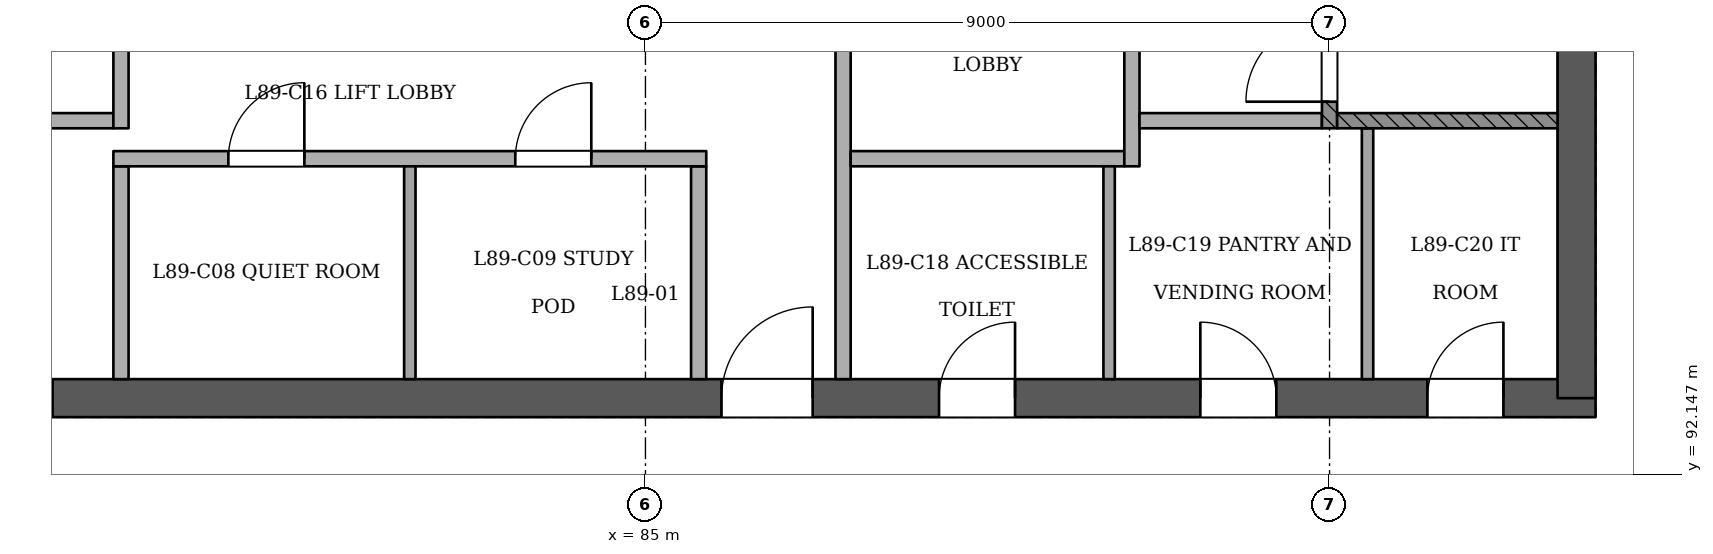
"""IFC4 building model, lengths in metres.
Left out: names, types, materials, properties, quantities, classifications, styles, units other than length and angle.
Written with IfcOpenShell. Run it as: python <this file> out.ifc"""

import sys

from ifc_helpers import new_model, si_unit, direction, frame, frame_2d, origin, place, context, subcontext, project, spatial, rectangle, extrude, element, fill, save


model = new_model("IFC4")
c1 = context("Model", 3, precision=1e-05, world=origin(), true_north=direction((0.0, 1.0)))
c2 = subcontext(c1, "Body", "Model", "MODEL_VIEW")
j1 = project(units=[si_unit("LENGTHUNIT", "METRE"), si_unit("PLANEANGLEUNIT", "RADIAN")], contexts=[c1])
p1 = place(None, origin())
s1 = spatial("IfcSite", under=j1, at=p1, CompositionType="ELEMENT")
p2 = place(p1, origin())
s2 = spatial("IfcBuilding", under=s1, at=p2, CompositionType="ELEMENT")
p3 = place(p2, frame((0.0, 0.0, 343.0)))
s3 = spatial("IfcBuildingStorey", under=s2, at=p3, CompositionType="ELEMENT", Elevation=343.0)
p4 = place(p3, frame((72.75, 93.15, 0.0), z_axis=(0.0, 0.0, 1.0), x_axis=(1.0, 0.0, 0.0)))
e1 = element("IfcWall", 1, at=p4, inside=s3, PredefinedType="SHEAR", context=c2, shape_type="SweptSolid", body=[
    extrude(rectangle(XDim=24.75, YDim=0.5, at=frame_2d((12.375, 0.0))), origin(), (0.0, 0.0, 1.0), 4.2),
])
p5 = place(p4, frame((1.05, 0.0, 0.0)))
e2 = element("IfcOpeningElement", 2, at=p5, cuts=e1, PredefinedType="OPENING", context=c2, shape_type="SweptSolid", body=[
    extrude(rectangle(XDim=1.2, YDim=2.1, at=frame_2d((0.6, 1.05))), frame((0.0, 0.26, 0.0), z_axis=(0.0, -1.0, 0.0), x_axis=(1.0, 0.0, 0.0)), (0.0, 0.0, 1.0), 0.521),
])
p6 = place(p4, frame((3.25, 0.0, 0.0)))
e3 = element("IfcOpeningElement", 3, at=p6, cuts=e1, PredefinedType="OPENING", context=c2, shape_type="SweptSolid", body=[
    extrude(rectangle(XDim=1.2, YDim=2.1, at=frame_2d((0.6, 1.05))), frame((0.0, 0.26, 0.0), z_axis=(0.0, -1.0, 0.0), x_axis=(1.0, 0.0, 0.0)), (0.0, 0.0, 1.0), 0.521),
])
p7 = place(p4, frame((13.25, 0.0, 0.0)))
e4 = element("IfcOpeningElement", 4, at=p7, cuts=e1, PredefinedType="OPENING", context=c2, shape_type="SweptSolid", body=[
    extrude(rectangle(XDim=1.2, YDim=2.1, at=frame_2d((0.6, 1.05))), frame((0.0, 0.26, 0.0), z_axis=(0.0, -1.0, 0.0), x_axis=(1.0, 0.0, 0.0)), (0.0, 0.0, 1.0), 0.521),
])
p8 = place(p4, frame((16.113, 0.0, 0.0)))
e5 = element("IfcOpeningElement", 5, at=p8, cuts=e1, PredefinedType="OPENING", context=c2, shape_type="SweptSolid", body=[
    extrude(rectangle(XDim=1.0, YDim=2.1, at=frame_2d((0.5, 1.05))), frame((0.0, 0.26, 0.0), z_axis=(0.0, -1.0, 0.0), x_axis=(1.0, 0.0, 0.0)), (0.0, 0.0, 1.0), 0.521),
])
p9 = place(p4, frame((19.55, 0.0, 0.0)))
e6 = element("IfcOpeningElement", 6, at=p9, cuts=e1, PredefinedType="OPENING", context=c2, shape_type="SweptSolid", body=[
    extrude(rectangle(XDim=1.0, YDim=2.1, at=frame_2d((0.5, 1.05))), frame((0.0, 0.26, 0.0), z_axis=(0.0, -1.0, 0.0), x_axis=(1.0, 0.0, 0.0)), (0.0, 0.0, 1.0), 0.521),
])
p10 = place(p4, frame((22.538, 0.0, 0.0)))
e7 = element("IfcOpeningElement", 7, at=p10, cuts=e1, PredefinedType="OPENING", context=c2, shape_type="SweptSolid", body=[
    extrude(rectangle(XDim=1.0, YDim=2.1, at=frame_2d((0.5, 1.05))), frame((0.0, 0.26, 0.0), z_axis=(0.0, -1.0, 0.0), x_axis=(1.0, 0.0, 0.0)), (0.0, 0.0, 1.0), 0.521),
])
p11 = place(p3, frame((97.25, 93.15, 0.0), z_axis=(0.0, 0.0, 1.0), x_axis=(0.0, 1.0, 0.0)))
e8 = element("IfcWall", 8, at=p11, inside=s3, PredefinedType="SHEAR", context=c2, shape_type="SweptSolid", body=[
    extrude(rectangle(XDim=10.75, YDim=0.5, at=frame_2d((5.375, 0.0))), origin(), (0.0, 0.0, 1.0), 4.2),
])
p12 = place(p3, frame((78.1, 93.4, 0.0), z_axis=(0.0, 0.0, 1.0), x_axis=(0.0, 1.0, 0.0)))
e9 = element("IfcWall", 9, at=p12, inside=s3, PredefinedType="PARTITIONING", context=c2, shape_type="SweptSolid", body=[
    extrude(rectangle(XDim=2.8, YDim=0.2, at=frame_2d((1.4, 0.0))), origin(), (0.0, 0.0, 1.0), 3.8),
])
p13 = place(p3, frame((81.9, 93.4, 0.0), z_axis=(0.0, 0.0, 1.0), x_axis=(0.0, 1.0, 0.0)))
e10 = element("IfcWall", 10, at=p13, inside=s3, PredefinedType="PARTITIONING", context=c2, shape_type="SweptSolid", body=[
    extrude(rectangle(XDim=2.8, YDim=0.15, at=frame_2d((1.4, 0.0))), origin(), (0.0, 0.0, 1.0), 3.8),
])
p14 = place(p3, frame((85.7, 93.4, 0.0), z_axis=(0.0, 0.0, 1.0), x_axis=(0.0, 1.0, 0.0)))
e11 = element("IfcWall", 11, at=p14, inside=s3, PredefinedType="PARTITIONING", context=c2, shape_type="SweptSolid", body=[
    extrude(rectangle(XDim=2.8, YDim=0.2, at=frame_2d((1.4, 0.0))), origin(), (0.0, 0.0, 1.0), 3.8),
])
p15 = place(p3, frame((87.6, 93.4, 0.0), z_axis=(0.0, 0.0, 1.0), x_axis=(0.0, 1.0, 0.0)))
e12 = element("IfcWall", 12, at=p15, inside=s3, PredefinedType="PARTITIONING", context=c2, shape_type="SweptSolid", body=[
    extrude(rectangle(XDim=7.0, YDim=0.2, at=frame_2d((3.5, 0.0))), origin(), (0.0, 0.0, 1.0), 3.8),
])
p16 = place(p15, frame((4.45, 0.0, 0.0)))
e13 = element("IfcOpeningElement", 13, at=p16, cuts=e12, PredefinedType="OPENING", context=c2, shape_type="SweptSolid", body=[
    extrude(rectangle(XDim=1.1, YDim=2.1, at=frame_2d((0.55, 1.05))), frame((0.0, 0.11, 0.0), z_axis=(0.0, -1.0, 0.0), x_axis=(1.0, 0.0, 0.0)), (0.0, 0.0, 1.0), 0.221),
])
p17 = place(p3, frame((91.1, 93.4, 0.0), z_axis=(0.0, 0.0, 1.0), x_axis=(0.0, 1.0, 0.0)))
e14 = element("IfcWall", 14, at=p17, inside=s3, PredefinedType="PARTITIONING", context=c2, shape_type="SweptSolid", body=[
    extrude(rectangle(XDim=2.8, YDim=0.15, at=frame_2d((1.4, 0.0))), origin(), (0.0, 0.0, 1.0), 3.8),
])
p18 = place(p3, frame((94.5, 93.4, 0.0), z_axis=(0.0, 0.0, 1.0), x_axis=(0.0, 1.0, 0.0)))
e15 = element("IfcWall", 15, at=p18, inside=s3, PredefinedType="PARTITIONING", context=c2, shape_type="SweptSolid", body=[
    extrude(rectangle(XDim=3.3, YDim=0.15, at=frame_2d((1.65, 0.0))), origin(), (0.0, 0.0, 1.0), 3.8),
])
p19 = place(p3, frame((78.0, 96.3, 0.0), z_axis=(0.0, 0.0, 1.0), x_axis=(1.0, 0.0, 0.0)))
e16 = element("IfcWall", 16, at=p19, inside=s3, PredefinedType="PARTITIONING", context=c2, shape_type="SweptSolid", body=[
    extrude(rectangle(XDim=7.8, YDim=0.2, at=frame_2d((3.9, 0.0))), origin(), (0.0, 0.0, 1.0), 3.8),
])
p20 = place(p19, frame((1.512, 0.0, 0.0)))
e17 = element("IfcOpeningElement", 17, at=p20, cuts=e16, PredefinedType="OPENING", context=c2, shape_type="SweptSolid", body=[
    extrude(rectangle(XDim=1.0, YDim=2.1, at=frame_2d((0.5, 1.05))), frame((0.0, 0.11, 0.0), z_axis=(0.0, -1.0, 0.0), x_axis=(1.0, 0.0, 0.0)), (0.0, 0.0, 1.0), 0.221),
])
p21 = place(p19, frame((5.288, 0.0, 0.0)))
e18 = element("IfcOpeningElement", 18, at=p21, cuts=e16, PredefinedType="OPENING", context=c2, shape_type="SweptSolid", body=[
    extrude(rectangle(XDim=1.0, YDim=2.1, at=frame_2d((0.5, 1.05))), frame((0.0, 0.11, 0.0), z_axis=(0.0, -1.0, 0.0), x_axis=(1.0, 0.0, 0.0)), (0.0, 0.0, 1.0), 0.221),
])
p22 = place(p3, frame((87.7, 96.3, 0.0), z_axis=(0.0, 0.0, 1.0), x_axis=(1.0, 0.0, 0.0)))
e19 = element("IfcWall", 19, at=p22, inside=s3, PredefinedType="PARTITIONING", context=c2, shape_type="SweptSolid", body=[
    extrude(rectangle(XDim=3.6, YDim=0.2, at=frame_2d((1.8, 0.0))), origin(), (0.0, 0.0, 1.0), 3.8),
])
p23 = place(p3, frame((91.4, 96.2, 0.0), z_axis=(0.0, 0.0, 1.0), x_axis=(0.0, 1.0, 0.0)))
e20 = element("IfcWall", 20, at=p23, inside=s3, PredefinedType="PARTITIONING", context=c2, shape_type="SweptSolid", body=[
    extrude(rectangle(XDim=4.2, YDim=0.2, at=frame_2d((2.1, 0.0))), origin(), (0.0, 0.0, 1.0), 3.8),
])
p24 = place(p23, frame((2.45, 0.0, 0.0)))
e21 = element("IfcOpeningElement", 21, at=p24, cuts=e20, PredefinedType="OPENING", context=c2, shape_type="SweptSolid", body=[
    extrude(rectangle(XDim=1.1, YDim=2.1, at=frame_2d((0.55, 1.05))), frame((0.0, 0.11, 0.0), z_axis=(0.0, -1.0, 0.0), x_axis=(1.0, 0.0, 0.0)), (0.0, 0.0, 1.0), 0.221),
])
p25 = place(p3, frame((76.1, 96.8, 0.0), z_axis=(0.0, 0.0, 1.0), x_axis=(1.0, 0.0, 0.0)))
e22 = element("IfcWall", 22, at=p25, inside=s3, PredefinedType="PARTITIONING", context=c2, shape_type="SweptSolid", body=[
    extrude(rectangle(XDim=1.9, YDim=0.2, at=frame_2d((0.95, 0.0))), origin(), (0.0, 0.0, 1.0), 3.8),
])
p26 = place(p3, frame((78.1, 96.7, 0.0), z_axis=(0.0, 0.0, 1.0), x_axis=(0.0, 1.0, 0.0)))
e23 = element("IfcWall", 23, at=p26, inside=s3, PredefinedType="PARTITIONING", context=c2, shape_type="SweptSolid", body=[
    extrude(rectangle(XDim=3.7, YDim=0.2, at=frame_2d((1.85, 0.0))), origin(), (0.0, 0.0, 1.0), 3.8),
])
p27 = place(p26, frame((1.95, 0.0, 0.0)))
e24 = element("IfcOpeningElement", 24, at=p27, cuts=e23, PredefinedType="OPENING", context=c2, shape_type="SweptSolid", body=[
    extrude(rectangle(XDim=1.1, YDim=2.1, at=frame_2d((0.55, 1.05))), frame((0.0, 0.11, 0.0), z_axis=(0.0, -1.0, 0.0), x_axis=(1.0, 0.0, 0.0)), (0.0, 0.0, 1.0), 0.221),
])
p28 = place(p3, frame((91.5, 96.8, 0.0), z_axis=(0.0, 0.0, 1.0), x_axis=(1.0, 0.0, 0.0)))
e25 = element("IfcWall", 25, at=p28, inside=s3, PredefinedType="PARTITIONING", context=c2, shape_type="SweptSolid", body=[
    extrude(rectangle(XDim=2.4, YDim=0.2, at=frame_2d((1.2, 0.0))), origin(), (0.0, 0.0, 1.0), 3.8),
])
p29 = place(p3, frame((94.0, 96.7, 0.0), z_axis=(0.0, 0.0, 1.0), x_axis=(0.0, 1.0, 0.0)))
e26 = element("IfcWall", 26, at=p29, inside=s3, PredefinedType="SOLIDWALL", context=c2, shape_type="SweptSolid", body=[
    extrude(rectangle(XDim=3.7, YDim=0.2, at=frame_2d((1.85, 0.0))), origin(), (0.0, 0.0, 1.0), 3.8),
])
p30 = place(p29, frame((0.35, 0.0, 0.0)))
e27 = element("IfcOpeningElement", 27, at=p30, cuts=e26, PredefinedType="OPENING", context=c2, shape_type="SweptSolid", body=[
    extrude(rectangle(XDim=1.1, YDim=2.1, at=frame_2d((0.55, 1.05))), frame((0.0, 0.11, 0.0), z_axis=(0.0, -1.0, 0.0), x_axis=(1.0, 0.0, 0.0)), (0.0, 0.0, 1.0), 0.221),
])
p31 = place(p3, frame((94.1, 96.8, 0.0), z_axis=(0.0, 0.0, 1.0), x_axis=(1.0, 0.0, 0.0)))
e28 = element("IfcWall", 28, at=p31, inside=s3, PredefinedType="SOLIDWALL", context=c2, shape_type="SweptSolid", body=[
    extrude(rectangle(XDim=2.9, YDim=0.2, at=frame_2d((1.45, 0.0))), origin(), (0.0, 0.0, 1.0), 3.8),
])
p32 = place(p30, origin())
e29 = element("IfcDoor", 29, at=p32, inside=s3, OperationType="SINGLE_SWING_LEFT", PredefinedType="NOTDEFINED", context=c2, shape_type="SweptSolid", body=[
    extrude(rectangle(XDim=1.1, YDim=2.1, at=frame_2d((0.55, 1.05))), frame((0.0, 0.025, 0.0), z_axis=(0.0, -1.0, 0.0), x_axis=(1.0, 0.0, 0.0)), (0.0, 0.0, 1.0), 0.05),
])
fill(e27, e29)
p33 = place(p6, origin())
e30 = element("IfcDoor", 30, at=p33, inside=s3, OperationType="SINGLE_SWING_LEFT", PredefinedType="NOTDEFINED", context=c2, shape_type="SweptSolid", body=[
    extrude(rectangle(XDim=1.2, YDim=2.1, at=frame_2d((0.6, 1.05))), frame((0.0, 0.025, 0.0), z_axis=(0.0, -1.0, 0.0), x_axis=(1.0, 0.0, 0.0)), (0.0, 0.0, 1.0), 0.05),
])
fill(e3, e30)
p34 = place(p7, origin())
e31 = element("IfcDoor", 31, at=p34, inside=s3, OperationType="SINGLE_SWING_RIGHT", PredefinedType="NOTDEFINED", context=c2, shape_type="SweptSolid", body=[
    extrude(rectangle(XDim=1.2, YDim=2.1, at=frame_2d((0.6, 1.05))), frame((0.0, 0.025, 0.0), z_axis=(0.0, -1.0, 0.0), x_axis=(1.0, 0.0, 0.0)), (0.0, 0.0, 1.0), 0.05),
])
fill(e4, e31)
p35 = place(p8, origin())
e32 = element("IfcDoor", 32, at=p35, inside=s3, OperationType="SINGLE_SWING_RIGHT", PredefinedType="NOTDEFINED", context=c2, shape_type="SweptSolid", body=[
    extrude(rectangle(XDim=1.0, YDim=2.1, at=frame_2d((0.5, 1.05))), frame((0.0, 0.025, 0.0), z_axis=(0.0, -1.0, 0.0), x_axis=(1.0, 0.0, 0.0)), (0.0, 0.0, 1.0), 0.05),
])
fill(e5, e32)
p36 = place(p9, origin())
e33 = element("IfcDoor", 33, at=p36, inside=s3, OperationType="SINGLE_SWING_LEFT", PredefinedType="NOTDEFINED", context=c2, shape_type="SweptSolid", body=[
    extrude(rectangle(XDim=1.0, YDim=2.1, at=frame_2d((0.5, 1.05))), frame((0.0, 0.025, 0.0), z_axis=(0.0, -1.0, 0.0), x_axis=(1.0, 0.0, 0.0)), (0.0, 0.0, 1.0), 0.05),
])
fill(e6, e33)
p37 = place(p10, origin())
e34 = element("IfcDoor", 34, at=p37, inside=s3, OperationType="SINGLE_SWING_RIGHT", PredefinedType="NOTDEFINED", context=c2, shape_type="SweptSolid", body=[
    extrude(rectangle(XDim=1.0, YDim=2.1, at=frame_2d((0.5, 1.05))), frame((0.0, 0.025, 0.0), z_axis=(0.0, -1.0, 0.0), x_axis=(1.0, 0.0, 0.0)), (0.0, 0.0, 1.0), 0.05),
])
fill(e7, e34)
p38 = place(p20, origin())
e35 = element("IfcDoor", 35, at=p38, inside=s3, OperationType="SINGLE_SWING_RIGHT", PredefinedType="NOTDEFINED", context=c2, shape_type="SweptSolid", body=[
    extrude(rectangle(XDim=1.0, YDim=2.1, at=frame_2d((0.5, 1.05))), frame((0.0, 0.025, 0.0), z_axis=(0.0, -1.0, 0.0), x_axis=(1.0, 0.0, 0.0)), (0.0, 0.0, 1.0), 0.05),
])
fill(e17, e35)
p39 = place(p21, origin())
e36 = element("IfcDoor", 36, at=p39, inside=s3, OperationType="SINGLE_SWING_RIGHT", PredefinedType="NOTDEFINED", context=c2, shape_type="SweptSolid", body=[
    extrude(rectangle(XDim=1.0, YDim=2.1, at=frame_2d((0.5, 1.05))), frame((0.0, 0.025, 0.0), z_axis=(0.0, -1.0, 0.0), x_axis=(1.0, 0.0, 0.0)), (0.0, 0.0, 1.0), 0.05),
])
fill(e18, e36)
save(model, sys.argv[1])
